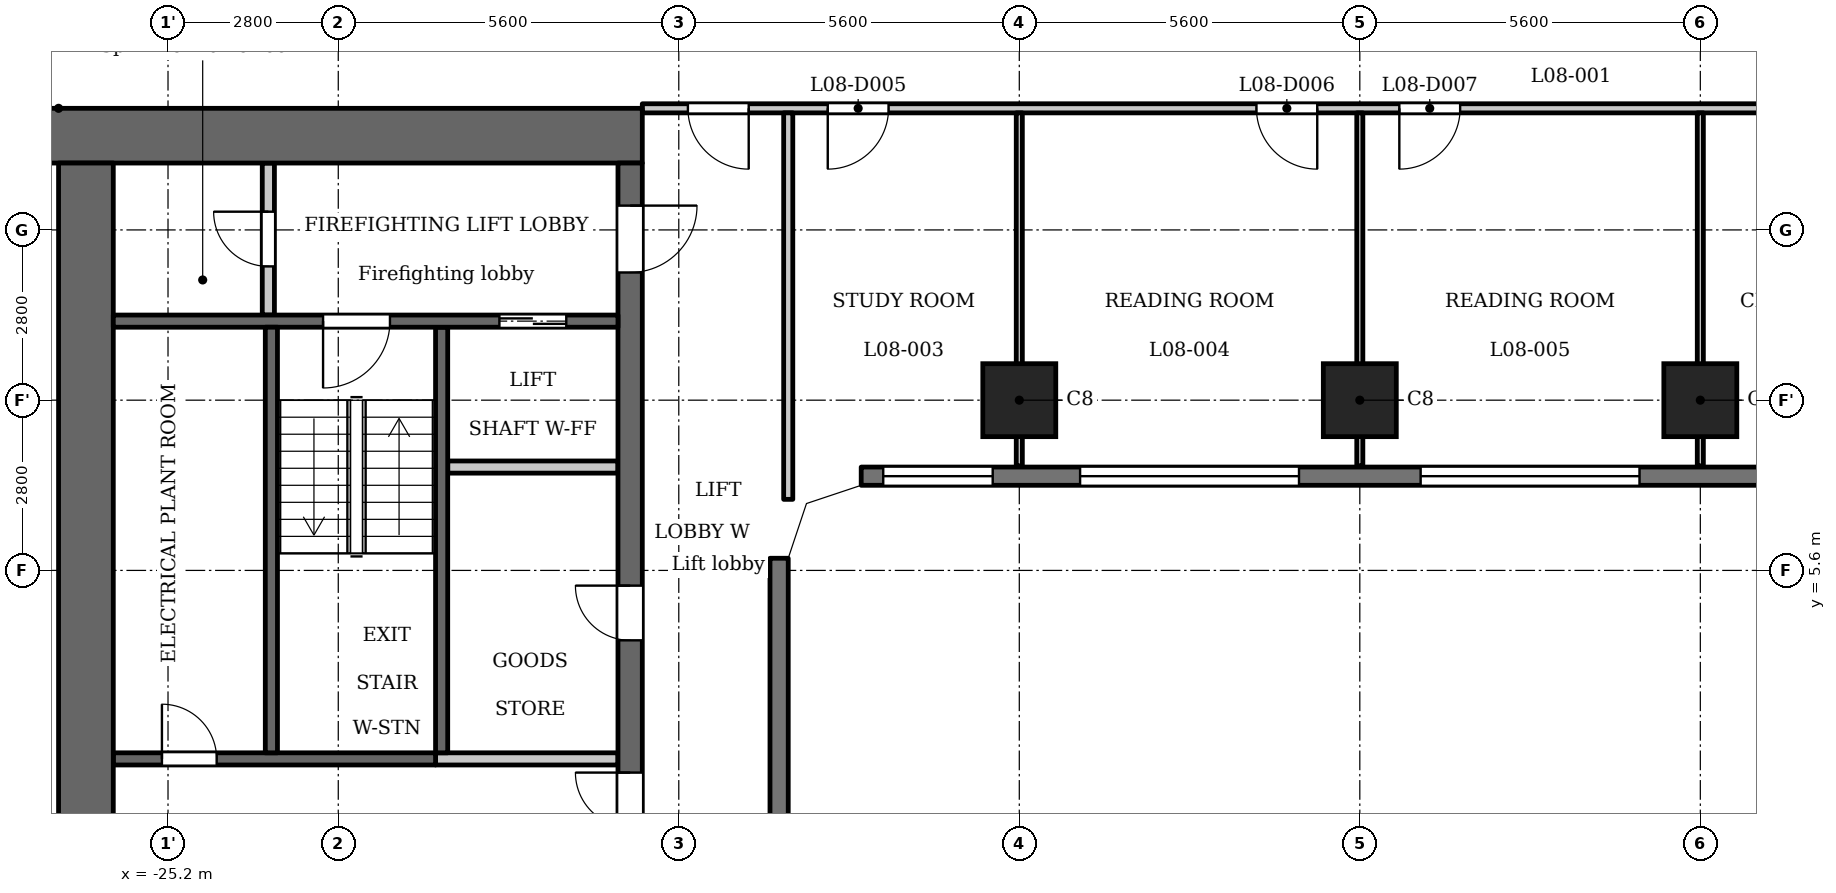
"""IFC4 building model, lengths in metres.
Left out: names, types, materials, properties, quantities, classifications, styles, units other than length and angle.
Written with IfcOpenShell. Run it as: python <this file> out.ifc"""

import sys

from ifc_helpers import new_model, si_unit, direction, frame, frame_2d, origin, origin_2d, place, context, subcontext, project, spatial, polyline, rectangle, outline, extrude, element, fill, save


model = new_model("IFC4")
c1 = context("Model", 3, precision=1e-05, world=origin(), true_north=direction((0.0, 1.0)))
c2 = subcontext(c1, "Body", "Model", "MODEL_VIEW")
j1 = project(units=[si_unit("LENGTHUNIT", "METRE"), si_unit("PLANEANGLEUNIT", "RADIAN")], contexts=[c1])
p1 = place(None, origin())
s1 = spatial("IfcSite", under=j1, at=p1, CompositionType="ELEMENT")
p2 = place(p1, origin())
s2 = spatial("IfcBuilding", under=s1, at=p2, CompositionType="ELEMENT")
p3 = place(p2, frame((0.0, 0.0, 37.5)))
s3 = spatial("IfcBuildingStorey", under=s2, at=p3, CompositionType="ELEMENT", Elevation=37.5)
for number, where, z_axis, x_axis in (
    (1, (-11.2, 8.4, 0.0), (0.0, 0.0, 1.0), (1.0, 0.0, 0.0)),
    (2, (-5.6, 8.4, 0.0), (0.0, 0.0, 1.0), (1.0, 0.0, 0.0)),
    (3, (0.0, 8.4, 0.0), (0.0, 0.0, 1.0), (1.0, 0.0, 0.0)),
):
    element("IfcColumn", number, at=place(p3, frame(where, z_axis=z_axis, x_axis=x_axis)), inside=s3, PredefinedType="COLUMN", context=c2, shape_type="SweptSolid", body=[
        extrude(rectangle(XDim=1.2, YDim=1.2, at=origin_2d()), origin(), (0.0, 0.0, 1.0), 3.5),
    ])
p4 = place(p3, frame((-15.15, -5.8, 0.0), z_axis=(0.0, 0.0, 1.0), x_axis=(0.0, 1.0, 0.0)))
e4 = element("IfcWall", 4, at=p4, inside=s3, PredefinedType="SOLIDWALL", context=c2, shape_type="SweptSolid", body=[
    extrude(rectangle(XDim=11.6, YDim=0.3, at=frame_2d((5.8, 0.0))), origin(), (0.0, 0.0, 1.0), 3.2),
])
p5 = place(p3, frame((-13.8, 7.15, 0.0), z_axis=(0.0, 0.0, 1.0), x_axis=(1.0, 0.0, 0.0)))
e5 = element("IfcWall", 5, at=p5, inside=s3, PredefinedType="SOLIDWALL", context=c2, shape_type="SweptSolid", body=[
    extrude(rectangle(XDim=27.6, YDim=0.3, at=frame_2d((13.8, 0.0))), origin(), (0.0, 0.0, 1.0), 3.2),
])
p6 = place(p5, frame((0.363, 0.0, 0.9)))
e6 = element("IfcOpeningElement", 6, at=p6, cuts=e5, PredefinedType="OPENING", context=c2, shape_type="SweptSolid", body=[
    extrude(rectangle(XDim=1.8, YDim=1.25, at=frame_2d((0.9, 0.625))), frame((0.0, 0.16, 0.0), z_axis=(0.0, -1.0, 0.0), x_axis=(1.0, 0.0, 0.0)), (0.0, 0.0, 1.0), 0.32),
])
p7 = place(p5, frame((3.6, 0.0, 1.2)))
e7 = element("IfcOpeningElement", 7, at=p7, cuts=e5, PredefinedType="OPENING", context=c2, shape_type="SweptSolid", body=[
    extrude(rectangle(XDim=3.6, YDim=0.95, at=frame_2d((1.8, 0.475))), frame((0.0, 0.16, 0.0), z_axis=(0.0, -1.0, 0.0), x_axis=(1.0, 0.0, 0.0)), (0.0, 0.0, 1.0), 0.32),
])
p8 = place(p5, frame((9.2, 0.0, 1.2)))
e8 = element("IfcOpeningElement", 8, at=p8, cuts=e5, PredefinedType="OPENING", context=c2, shape_type="SweptSolid", body=[
    extrude(rectangle(XDim=3.6, YDim=0.95, at=frame_2d((1.8, 0.475))), frame((0.0, 0.16, 0.0), z_axis=(0.0, -1.0, 0.0), x_axis=(1.0, 0.0, 0.0)), (0.0, 0.0, 1.0), 0.32),
])
p9 = place(p5, frame((14.8, 0.0, 1.2)))
e9 = element("IfcOpeningElement", 9, at=p9, cuts=e5, PredefinedType="OPENING", context=c2, shape_type="SweptSolid", body=[
    extrude(rectangle(XDim=3.6, YDim=0.95, at=frame_2d((1.8, 0.475))), frame((0.0, 0.16, 0.0), z_axis=(0.0, -1.0, 0.0), x_axis=(1.0, 0.0, 0.0)), (0.0, 0.0, 1.0), 0.32),
])
p10 = place(p5, frame((20.4, 0.0, 1.2)))
e10 = element("IfcOpeningElement", 10, at=p10, cuts=e5, PredefinedType="OPENING", context=c2, shape_type="SweptSolid", body=[
    extrude(rectangle(XDim=3.6, YDim=0.95, at=frame_2d((1.8, 0.475))), frame((0.0, 0.16, 0.0), z_axis=(0.0, -1.0, 0.0), x_axis=(1.0, 0.0, 0.0)), (0.0, 0.0, 1.0), 0.32),
])
p11 = place(p5, frame((25.438, 0.0, 0.9)))
e11 = element("IfcOpeningElement", 11, at=p11, cuts=e5, PredefinedType="OPENING", context=c2, shape_type="SweptSolid", body=[
    extrude(rectangle(XDim=1.8, YDim=1.25, at=frame_2d((0.9, 0.625))), frame((0.0, 0.16, 0.0), z_axis=(0.0, -1.0, 0.0), x_axis=(1.0, 0.0, 0.0)), (0.0, 0.0, 1.0), 0.32),
])
p12 = place(p3, frame((-20.7, 2.6, 0.0), z_axis=(0.0, 0.0, 1.0), x_axis=(0.0, 1.0, 0.0)))
e12 = element("IfcWall", 12, at=p12, inside=s3, PredefinedType="SHEAR", context=c2, shape_type="SweptSolid", body=[
    extrude(rectangle(XDim=7.0, YDim=0.2, at=frame_2d((3.5, 0.0))), origin(), (0.0, 0.0, 1.0), 3.2),
])
p13 = place(p3, frame((-20.8, 2.5, 0.0), z_axis=(0.0, 0.0, 1.0), x_axis=(-1.0, 0.0, 0.0)))
e13 = element("IfcWall", 13, at=p13, inside=s3, PredefinedType="SHEAR", context=c2, shape_type="SweptSolid", body=[
    extrude(rectangle(XDim=5.3, YDim=0.2, at=frame_2d((2.65, 0.0))), origin(), (0.0, 0.0, 1.0), 3.2),
])
p14 = place(p13, frame((3.6, 0.0, 0.0)))
e14 = element("IfcOpeningElement", 14, at=p14, cuts=e13, PredefinedType="OPENING", context=c2, shape_type="SweptSolid", body=[
    extrude(rectangle(XDim=0.9, YDim=2.1, at=frame_2d((0.45, 1.05))), frame((0.0, 0.11, 0.0), z_axis=(0.0, -1.0, 0.0), x_axis=(1.0, 0.0, 0.0)), (0.0, 0.0, 1.0), 0.22),
])
p15 = place(p3, frame((-17.4, 12.75, 0.0), z_axis=(0.0, 0.0, 1.0), x_axis=(-1.0, 0.0, 0.0)))
e15 = element("IfcWall", 15, at=p15, inside=s3, PredefinedType="SHEAR", context=c2, shape_type="SweptSolid", body=[
    extrude(rectangle(XDim=10.4, YDim=0.9, at=frame_2d((5.2, 0.0))), origin(), (0.0, 0.0, 1.0), 3.2),
])
p16 = place(p3, frame((-17.6, -12.3, 0.0), z_axis=(0.0, 0.0, 1.0), x_axis=(0.0, 1.0, 0.0)))
e16 = element("IfcWall", 16, at=p16, inside=s3, PredefinedType="SHEAR", context=c2, shape_type="SweptSolid", body=[
    extrude(rectangle(XDim=24.6, YDim=0.4, at=frame_2d((12.3, 0.0))), origin(), (0.0, 0.0, 1.0), 3.2),
])
p17 = place(p16, frame((6.0, 0.0, 0.0)))
e17 = element("IfcOpeningElement", 17, at=p17, cuts=e16, PredefinedType="OPENING", context=c2, shape_type="SweptSolid", body=[
    extrude(rectangle(XDim=1.1, YDim=2.1, at=frame_2d((0.55, 1.05))), frame((0.0, 0.21, 0.0), z_axis=(0.0, -1.0, 0.0), x_axis=(1.0, 0.0, 0.0)), (0.0, 0.0, 1.0), 0.42),
])
p18 = place(p16, frame((8.4, 0.0, 0.0)))
e18 = element("IfcOpeningElement", 18, at=p18, cuts=e16, PredefinedType="OPENING", context=c2, shape_type="SweptSolid", body=[
    extrude(rectangle(XDim=1.1, YDim=2.1, at=frame_2d((0.55, 1.05))), frame((0.0, 0.21, 0.0), z_axis=(0.0, -1.0, 0.0), x_axis=(1.0, 0.0, 0.0)), (0.0, 0.0, 1.0), 0.42),
])
p19 = place(p16, frame((10.8, 0.0, 0.0)))
e19 = element("IfcOpeningElement", 19, at=p19, cuts=e16, PredefinedType="OPENING", context=c2, shape_type="SweptSolid", body=[
    extrude(rectangle(XDim=1.1, YDim=2.1, at=frame_2d((0.55, 1.05))), frame((0.0, 0.21, 0.0), z_axis=(0.0, -1.0, 0.0), x_axis=(1.0, 0.0, 0.0)), (0.0, 0.0, 1.0), 0.42),
])
p20 = place(p16, frame((16.75, 0.0, 0.0)))
e20 = element("IfcOpeningElement", 20, at=p20, cuts=e16, PredefinedType="OPENING", context=c2, shape_type="SweptSolid", body=[
    extrude(rectangle(XDim=0.9, YDim=2.1, at=frame_2d((0.45, 1.05))), frame((0.0, 0.21, 0.0), z_axis=(0.0, -1.0, 0.0), x_axis=(1.0, 0.0, 0.0)), (0.0, 0.0, 1.0), 0.42),
])
p21 = place(p16, frame((22.8, 0.0, 0.0)))
e21 = element("IfcOpeningElement", 21, at=p21, cuts=e16, PredefinedType="OPENING", context=c2, shape_type="SweptSolid", body=[
    extrude(rectangle(XDim=1.1, YDim=2.1, at=frame_2d((0.55, 1.05))), frame((0.0, 0.21, 0.0), z_axis=(0.0, -1.0, 0.0), x_axis=(1.0, 0.0, 0.0)), (0.0, 0.0, 1.0), 0.42),
])
p22 = place(p16, frame((0.7, 0.0, 0.0)))
e22 = element("IfcOpeningElement", 22, at=p22, cuts=e16, PredefinedType="OPENING", context=c2, shape_type="SweptSolid", body=[
    extrude(rectangle(XDim=1.1, YDim=2.1, at=frame_2d((0.55, 1.05))), frame((0.0, 0.21, 0.0), z_axis=(0.0, -1.0, 0.0), x_axis=(1.0, 0.0, 0.0)), (0.0, 0.0, 1.0), 0.42),
])
p23 = place(p16, frame((12.775, 0.0, 0.0)))
e23 = element("IfcOpeningElement", 23, at=p23, cuts=e16, PredefinedType="OPENING", context=c2, shape_type="SweptSolid", body=[
    extrude(rectangle(XDim=1.8, YDim=2.1, at=frame_2d((0.9, 1.05))), frame((0.0, 0.21, 0.0), z_axis=(0.0, -1.0, 0.0), x_axis=(1.0, 0.0, 0.0)), (0.0, 0.0, 1.0), 0.42),
])
p24 = place(p3, frame((-26.55, -12.3, 0.0), z_axis=(0.0, 0.0, 1.0), x_axis=(0.0, 1.0, 0.0)))
e24 = element("IfcWall", 24, at=p24, inside=s3, PredefinedType="SHEAR", context=c2, shape_type="SweptSolid", body=[
    extrude(rectangle(XDim=24.6, YDim=0.9, at=frame_2d((12.3, 0.0))), origin(), (0.0, 0.0, 1.0), 3.2),
])
p25 = place(p3, frame((-23.55, 9.8, 0.0), z_axis=(0.0, 0.0, 1.0), x_axis=(0.0, 1.0, 0.0)))
e25 = element("IfcWall", 25, at=p25, inside=s3, PredefinedType="PARTITIONING", context=c2, shape_type="SweptSolid", body=[
    extrude(rectangle(XDim=2.5, YDim=0.2, at=frame_2d((1.25, 0.0))), origin(), (0.0, 0.0, 1.0), 3.2),
])
p26 = place(p25, frame((0.8, 0.0, 0.0)))
e26 = element("IfcOpeningElement", 26, at=p26, cuts=e25, PredefinedType="OPENING", context=c2, shape_type="SweptSolid", body=[
    extrude(rectangle(XDim=0.9, YDim=2.1, at=frame_2d((0.45, 1.05))), frame((0.0, 0.11, 0.0), z_axis=(0.0, -1.0, 0.0), x_axis=(1.0, 0.0, 0.0)), (0.0, 0.0, 1.0), 0.22),
])
p27 = place(p3, frame((-17.8, 2.5, 0.0), z_axis=(0.0, 0.0, 1.0), x_axis=(-1.0, 0.0, 0.0)))
e27 = element("IfcWall", 27, at=p27, inside=s3, PredefinedType="PARTITIONING", context=c2, shape_type="SweptSolid", body=[
    extrude(rectangle(XDim=3.0, YDim=0.2, at=frame_2d((1.5, 0.0))), origin(), (0.0, 0.0, 1.0), 3.2),
])
p28 = place(p3, frame((-17.8, 7.3, 0.0), z_axis=(0.0, 0.0, 1.0), x_axis=(-1.0, 0.0, 0.0)))
e28 = element("IfcWall", 28, at=p28, inside=s3, PredefinedType="PARTITIONING", context=c2, shape_type="SweptSolid", body=[
    extrude(rectangle(XDim=2.8, YDim=0.2, at=frame_2d((1.4, 0.0))), origin(), (0.0, 0.0, 1.0), 3.2),
])
p29 = place(p3, frame((-17.8, 9.7, 0.0), z_axis=(0.0, 0.0, 1.0), x_axis=(-1.0, 0.0, 0.0)))
e29 = element("IfcWall", 29, at=p29, inside=s3, PredefinedType="SHEAR", context=c2, shape_type="SweptSolid", body=[
    extrude(rectangle(XDim=8.3, YDim=0.2, at=frame_2d((4.15, 0.0))), origin(), (0.0, 0.0, 1.0), 3.2),
])
p30 = place(p29, frame((0.85, 0.0, 0.0)))
e30 = element("IfcOpeningElement", 30, at=p30, cuts=e29, PredefinedType="OPENING", context=c2, shape_type="SweptSolid", body=[
    extrude(rectangle(XDim=1.1, YDim=2.1, at=frame_2d((0.55, 1.05))), frame((0.0, 0.11, 0.0), z_axis=(0.0, -1.0, 0.0), x_axis=(1.0, 0.0, 0.0)), (0.0, 0.0, 1.0), 0.22),
])
p31 = place(p29, frame((3.75, 0.0, 0.0)))
e31 = element("IfcOpeningElement", 31, at=p31, cuts=e29, PredefinedType="OPENING", context=c2, shape_type="SweptSolid", body=[
    extrude(rectangle(XDim=1.1, YDim=2.1, at=frame_2d((0.55, 1.05))), frame((0.0, 0.11, 0.0), z_axis=(0.0, -1.0, 0.0), x_axis=(1.0, 0.0, 0.0)), (0.0, 0.0, 1.0), 0.22),
])
p32 = place(p3, frame((-23.5, 2.6, 0.0), z_axis=(0.0, 0.0, 1.0), x_axis=(0.0, 1.0, 0.0)))
e32 = element("IfcWall", 32, at=p32, inside=s3, PredefinedType="SHEAR", context=c2, shape_type="SweptSolid", body=[
    extrude(rectangle(XDim=7.0, YDim=0.2, at=frame_2d((3.5, 0.0))), origin(), (0.0, 0.0, 1.0), 3.2),
])
p33 = place(p3, frame((-17.4, 13.2, 0.0), z_axis=(0.0, 0.0, 1.0), x_axis=(1.0, 0.0, 0.0)))
e33 = element("IfcWall", 33, at=p33, inside=s3, PredefinedType="PARTITIONING", context=c2, shape_type="SweptSolid", body=[
    extrude(rectangle(XDim=34.8, YDim=0.15, at=frame_2d((17.4, 0.0))), origin(), (0.0, 0.0, 1.0), 3.2),
])
p34 = place(p33, frame((0.75, 0.0, 0.0)))
e34 = element("IfcOpeningElement", 34, at=p34, cuts=e33, PredefinedType="OPENING", context=c2, shape_type="SweptSolid", body=[
    extrude(rectangle(XDim=1.0, YDim=2.1, at=frame_2d((0.5, 1.05))), frame((0.0, 0.085, 0.0), z_axis=(0.0, -1.0, 0.0), x_axis=(1.0, 0.0, 0.0)), (0.0, 0.0, 1.0), 0.17),
])
p35 = place(p33, frame((33.15, 0.0, 0.0)))
e35 = element("IfcOpeningElement", 35, at=p35, cuts=e33, PredefinedType="OPENING", context=c2, shape_type="SweptSolid", body=[
    extrude(rectangle(XDim=1.0, YDim=2.1, at=frame_2d((0.5, 1.05))), frame((0.0, 0.085, 0.0), z_axis=(0.0, -1.0, 0.0), x_axis=(1.0, 0.0, 0.0)), (0.0, 0.0, 1.0), 0.17),
])
p36 = place(p33, frame((3.05, 0.0, 0.0)))
e36 = element("IfcOpeningElement", 36, at=p36, cuts=e33, PredefinedType="OPENING", context=c2, shape_type="SweptSolid", body=[
    extrude(rectangle(XDim=1.0, YDim=2.1, at=frame_2d((0.5, 1.05))), frame((0.0, 0.085, 0.0), z_axis=(0.0, -1.0, 0.0), x_axis=(1.0, 0.0, 0.0)), (0.0, 0.0, 1.0), 0.17),
])
p37 = place(p33, frame((10.1, 0.0, 0.0)))
e37 = element("IfcOpeningElement", 37, at=p37, cuts=e33, PredefinedType="OPENING", context=c2, shape_type="SweptSolid", body=[
    extrude(rectangle(XDim=1.0, YDim=2.1, at=frame_2d((0.5, 1.05))), frame((0.0, 0.085, 0.0), z_axis=(0.0, -1.0, 0.0), x_axis=(1.0, 0.0, 0.0)), (0.0, 0.0, 1.0), 0.17),
])
p38 = place(p33, frame((12.45, 0.0, 0.0)))
e38 = element("IfcOpeningElement", 38, at=p38, cuts=e33, PredefinedType="OPENING", context=c2, shape_type="SweptSolid", body=[
    extrude(rectangle(XDim=1.0, YDim=2.1, at=frame_2d((0.5, 1.05))), frame((0.0, 0.085, 0.0), z_axis=(0.0, -1.0, 0.0), x_axis=(1.0, 0.0, 0.0)), (0.0, 0.0, 1.0), 0.17),
])
p39 = place(p33, frame((21.3, 0.0, 0.0)))
e39 = element("IfcOpeningElement", 39, at=p39, cuts=e33, PredefinedType="OPENING", context=c2, shape_type="SweptSolid", body=[
    extrude(rectangle(XDim=1.0, YDim=2.1, at=frame_2d((0.5, 1.05))), frame((0.0, 0.085, 0.0), z_axis=(0.0, -1.0, 0.0), x_axis=(1.0, 0.0, 0.0)), (0.0, 0.0, 1.0), 0.17),
])
p40 = place(p33, frame((23.65, 0.0, 0.0)))
e40 = element("IfcOpeningElement", 40, at=p40, cuts=e33, PredefinedType="OPENING", context=c2, shape_type="SweptSolid", body=[
    extrude(rectangle(XDim=1.0, YDim=2.1, at=frame_2d((0.5, 1.05))), frame((0.0, 0.085, 0.0), z_axis=(0.0, -1.0, 0.0), x_axis=(1.0, 0.0, 0.0)), (0.0, 0.0, 1.0), 0.17),
])
p41 = place(p33, frame((30.75, 0.0, 0.0)))
e41 = element("IfcOpeningElement", 41, at=p41, cuts=e33, PredefinedType="OPENING", context=c2, shape_type="SweptSolid", body=[
    extrude(rectangle(XDim=1.0, YDim=2.1, at=frame_2d((0.5, 1.05))), frame((0.0, 0.085, 0.0), z_axis=(0.0, -1.0, 0.0), x_axis=(1.0, 0.0, 0.0)), (0.0, 0.0, 1.0), 0.17),
])
p42 = place(p3, frame((-15.0, 6.769, 0.0), z_axis=(0.0, 0.0, 1.0), x_axis=(0.0, 1.0, 0.0)))
e42 = element("IfcWall", 42, at=p42, inside=s3, PredefinedType="PARTITIONING", context=c2, shape_type="SweptSolid", body=[
    extrude(rectangle(XDim=6.356, YDim=0.15, at=frame_2d((3.178, 0.0))), origin(), (0.0, 0.0, 1.0), 3.2),
])
for number, where, z_axis, x_axis in (
    (43, (-11.2, 7.32, 0.0), (0.0, 0.0, 1.0), (0.0, 1.0, 0.0)),
    (44, (-5.6, 7.32, 0.0), (0.0, 0.0, 1.0), (0.0, 1.0, 0.0)),
    (45, (0.0, 7.32, 0.0), (0.0, 0.0, 1.0), (0.0, 1.0, 0.0)),
):
    element("IfcWall", number, at=place(p3, frame(where, z_axis=z_axis, x_axis=x_axis)), inside=s3, PredefinedType="PARTITIONING", context=c2, shape_type="SweptSolid", body=[
        extrude(rectangle(XDim=5.805, YDim=0.1, at=frame_2d((2.902, 0.0))), origin(), (0.0, 0.0, 1.0), 3.2),
    ])
p43 = place(p3, origin())
e46 = element("IfcWall", 46, at=p43, inside=s3, PredefinedType="SOLIDWALL", context=c2, shape_type="SweptSolid", body=[
    extrude(outline(polyline([(-13.849, 7.3), (-14.937, 6.937), (-15.3, 5.849), (-15.3, 5.8), (-15.0, 5.8), (-14.7, 6.7), (-13.8, 7.0), (-13.8, 7.3), (-13.849, 7.3)])), origin(), (0.0, 0.0, 1.0), 3.2),
])
p44 = place(p20, origin())
e47 = element("IfcDoor", 47, at=p44, inside=s3, OperationType="SINGLE_SWING_LEFT", PredefinedType="DOOR", context=c2, shape_type="SweptSolid", body=[
    extrude(rectangle(XDim=0.9, YDim=2.1, at=frame_2d((0.45, 1.05))), frame((0.0, 0.025, 0.0), z_axis=(0.0, -1.0, 0.0), x_axis=(1.0, 0.0, 0.0)), (0.0, 0.0, 1.0), 0.05),
])
fill(e20, e47)
p45 = place(p30, origin())
e48 = element("IfcDoor", 48, at=p45, inside=s3, OperationType="DOUBLE_DOOR_SLIDING", PredefinedType="DOOR", context=c2, shape_type="SweptSolid", body=[
    extrude(rectangle(XDim=1.1, YDim=2.1, at=frame_2d((0.55, 1.05))), frame((0.0, 0.025, 0.0), z_axis=(0.0, -1.0, 0.0), x_axis=(1.0, 0.0, 0.0)), (0.0, 0.0, 1.0), 0.05),
])
fill(e30, e48)
p46 = place(p21, origin())
e49 = element("IfcDoor", 49, at=p46, inside=s3, OperationType="SINGLE_SWING_RIGHT", PredefinedType="DOOR", context=c2, shape_type="SweptSolid", body=[
    extrude(rectangle(XDim=1.1, YDim=2.1, at=frame_2d((0.55, 1.05))), frame((0.0, 0.025, 0.0), z_axis=(0.0, -1.0, 0.0), x_axis=(1.0, 0.0, 0.0)), (0.0, 0.0, 1.0), 0.05),
])
fill(e21, e49)
p47 = place(p26, origin())
e50 = element("IfcDoor", 50, at=p47, inside=s3, OperationType="SINGLE_SWING_LEFT", PredefinedType="DOOR", context=c2, shape_type="SweptSolid", body=[
    extrude(rectangle(XDim=0.9, YDim=2.1, at=frame_2d((0.45, 1.05))), frame((0.0, 0.025, 0.0), z_axis=(0.0, -1.0, 0.0), x_axis=(1.0, 0.0, 0.0)), (0.0, 0.0, 1.0), 0.05),
])
fill(e26, e50)
p48 = place(p31, origin())
e51 = element("IfcDoor", 51, at=p48, inside=s3, OperationType="SINGLE_SWING_LEFT", PredefinedType="DOOR", context=c2, shape_type="SweptSolid", body=[
    extrude(rectangle(XDim=1.1, YDim=2.1, at=frame_2d((0.55, 1.05))), frame((0.0, 0.025, 0.0), z_axis=(0.0, -1.0, 0.0), x_axis=(1.0, 0.0, 0.0)), (0.0, 0.0, 1.0), 0.05),
])
fill(e31, e51)
p49 = place(p23, origin())
e52 = element("IfcDoor", 52, at=p49, inside=s3, OperationType="DOUBLE_DOOR_SINGLE_SWING", PredefinedType="DOOR", context=c2, shape_type="SweptSolid", body=[
    extrude(rectangle(XDim=1.8, YDim=2.1, at=frame_2d((0.9, 1.05))), frame((0.0, 0.025, 0.0), z_axis=(0.0, -1.0, 0.0), x_axis=(1.0, 0.0, 0.0)), (0.0, 0.0, 1.0), 0.05),
])
fill(e23, e52)
p50 = place(p14, origin())
e53 = element("IfcDoor", 53, at=p50, inside=s3, OperationType="SINGLE_SWING_RIGHT", PredefinedType="DOOR", context=c2, shape_type="SweptSolid", body=[
    extrude(rectangle(XDim=0.9, YDim=2.1, at=frame_2d((0.45, 1.05))), frame((0.0, 0.025, 0.0), z_axis=(0.0, -1.0, 0.0), x_axis=(1.0, 0.0, 0.0)), (0.0, 0.0, 1.0), 0.05),
])
fill(e14, e53)
p51 = place(p34, origin())
e54 = element("IfcDoor", 54, at=p51, inside=s3, OperationType="SINGLE_SWING_RIGHT", PredefinedType="DOOR", context=c2, shape_type="SweptSolid", body=[
    extrude(rectangle(XDim=1.0, YDim=2.1, at=frame_2d((0.5, 1.05))), frame((0.0, 0.025, 0.0), z_axis=(0.0, -1.0, 0.0), x_axis=(1.0, 0.0, 0.0)), (0.0, 0.0, 1.0), 0.05),
])
fill(e34, e54)
p52 = place(p36, origin())
e55 = element("IfcDoor", 55, at=p52, inside=s3, OperationType="SINGLE_SWING_LEFT", PredefinedType="DOOR", context=c2, shape_type="SweptSolid", body=[
    extrude(rectangle(XDim=1.0, YDim=2.1, at=frame_2d((0.5, 1.05))), frame((0.0, 0.025, 0.0), z_axis=(0.0, -1.0, 0.0), x_axis=(1.0, 0.0, 0.0)), (0.0, 0.0, 1.0), 0.05),
])
fill(e36, e55)
p53 = place(p37, origin())
e56 = element("IfcDoor", 56, at=p53, inside=s3, OperationType="SINGLE_SWING_RIGHT", PredefinedType="DOOR", context=c2, shape_type="SweptSolid", body=[
    extrude(rectangle(XDim=1.0, YDim=2.1, at=frame_2d((0.5, 1.05))), frame((0.0, 0.025, 0.0), z_axis=(0.0, -1.0, 0.0), x_axis=(1.0, 0.0, 0.0)), (0.0, 0.0, 1.0), 0.05),
])
fill(e37, e56)
p54 = place(p38, origin())
e57 = element("IfcDoor", 57, at=p54, inside=s3, OperationType="SINGLE_SWING_LEFT", PredefinedType="DOOR", context=c2, shape_type="SweptSolid", body=[
    extrude(rectangle(XDim=1.0, YDim=2.1, at=frame_2d((0.5, 1.05))), frame((0.0, 0.025, 0.0), z_axis=(0.0, -1.0, 0.0), x_axis=(1.0, 0.0, 0.0)), (0.0, 0.0, 1.0), 0.05),
])
fill(e38, e57)
p55 = place(p6, origin())
e58 = element("IfcWindow", 58, at=p55, inside=s3, PartitioningType="SINGLE_PANEL", PredefinedType="WINDOW", context=c2, shape_type="SweptSolid", body=[
    extrude(rectangle(XDim=1.8, YDim=1.25, at=frame_2d((0.9, 0.625))), frame((0.0, 0.03, 0.0), z_axis=(0.0, -1.0, 0.0), x_axis=(1.0, 0.0, 0.0)), (0.0, 0.0, 1.0), 0.06),
])
fill(e6, e58)
p56 = place(p7, origin())
e59 = element("IfcWindow", 59, at=p56, inside=s3, PartitioningType="SINGLE_PANEL", PredefinedType="WINDOW", context=c2, shape_type="SweptSolid", body=[
    extrude(rectangle(XDim=3.6, YDim=0.95, at=frame_2d((1.8, 0.475))), frame((0.0, 0.03, 0.0), z_axis=(0.0, -1.0, 0.0), x_axis=(1.0, 0.0, 0.0)), (0.0, 0.0, 1.0), 0.06),
])
fill(e7, e59)
p57 = place(p8, origin())
e60 = element("IfcWindow", 60, at=p57, inside=s3, PartitioningType="SINGLE_PANEL", PredefinedType="WINDOW", context=c2, shape_type="SweptSolid", body=[
    extrude(rectangle(XDim=3.6, YDim=0.95, at=frame_2d((1.8, 0.475))), frame((0.0, 0.03, 0.0), z_axis=(0.0, -1.0, 0.0), x_axis=(1.0, 0.0, 0.0)), (0.0, 0.0, 1.0), 0.06),
])
fill(e8, e60)
save(model, sys.argv[1])
